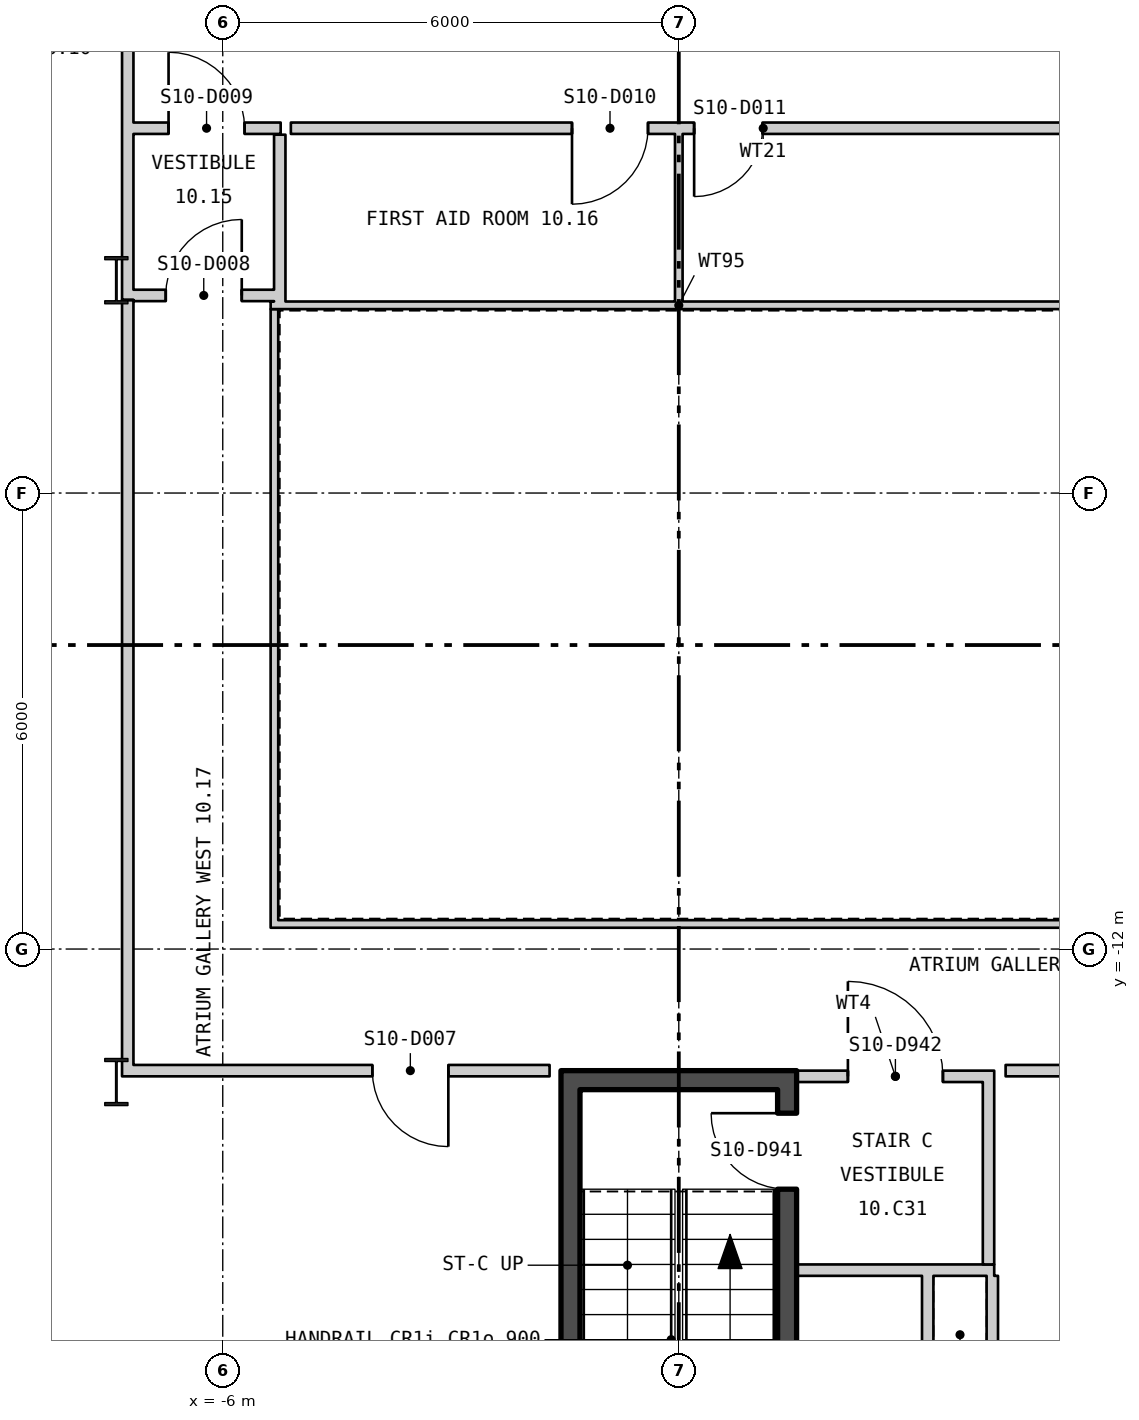
"""IFC4 building model, lengths in metres.
Left out: names, types, materials, properties, quantities, classifications, styles, units other than length and angle.
Written with IfcOpenShell. Run it as: python <this file> out.ifc"""

import sys

from ifc_helpers import new_model, si_unit, direction, frame, frame_2d, origin, origin_2d, place, context, subcontext, project, spatial, polyline, rectangle, i_section, outline, extrude, element, fill, save


model = new_model("IFC4")
c1 = context("Model", 3, precision=1e-05, world=origin(), true_north=direction((0.0, 1.0)))
c2 = subcontext(c1, "Body", "Model", "MODEL_VIEW")
j1 = project(units=[si_unit("LENGTHUNIT", "METRE"), si_unit("PLANEANGLEUNIT", "RADIAN")], contexts=[c1])
p1 = place(None, origin())
s1 = spatial("IfcSite", under=j1, at=p1, CompositionType="ELEMENT")
p2 = place(p1, origin())
s2 = spatial("IfcBuilding", under=s1, at=p2, CompositionType="ELEMENT")
p3 = place(p2, frame((0.0, 0.0, 139.8)))
s3 = spatial("IfcBuildingStorey", under=s2, at=p3, CompositionType="ELEMENT", Elevation=139.8)
for number, where, z_axis, x_axis in (
    (1, (-7.4, -3.2, 0.0), (0.0, 0.0, 1.0), (1.0, 0.0, 0.0)),
    (2, (-7.4, -13.75, 0.0), (0.0, 0.0, 1.0), (1.0, 0.0, 0.0)),
):
    element("IfcColumn", number, at=place(p3, frame(where, z_axis=z_axis, x_axis=x_axis)), inside=s3, PredefinedType="COLUMN", context=c2, shape_type="SweptSolid", body=[
        extrude(i_section(OverallWidth=0.305, OverallDepth=0.62, WebThickness=0.021, FlangeThickness=0.04, at=origin_2d()), origin(), (0.0, 0.0, 1.0), 3.9),
    ])
p4 = place(p3, frame((-27.235, 12.423, -0.18), z_axis=(0.0, 0.0, 1.0), x_axis=(0.500000335318, -0.866025210188, 0.0)))
e3 = element("IfcWall", 3, at=p4, inside=s3, PredefinedType="SOLIDWALL", context=c2, shape_type="SweptSolid", body=[
    extrude(outline(polyline([(-0.13, -0.225), (45.88, -0.225), (45.62, 0.225), (0.13, 0.225), (-0.13, -0.225)])), origin(), (0.0, 0.0, 1.0), 3.68),
])
p5 = place(p4, frame((1.425, 0.0, 1.08)))
e4 = element("IfcOpeningElement", 4, at=p5, cuts=e3, PredefinedType="OPENING", context=c2, shape_type="SweptSolid", body=[
    extrude(rectangle(XDim=2.4, YDim=2.0, at=frame_2d((1.2, 1.0))), frame((0.0, 0.235, 0.0), z_axis=(0.0, -1.0, 0.0), x_axis=(1.0, 0.0, 0.0)), (0.0, 0.0, 1.0), 0.47),
])
p6 = place(p4, frame((5.895, 0.0, 1.08)))
e5 = element("IfcOpeningElement", 5, at=p6, cuts=e3, PredefinedType="OPENING", context=c2, shape_type="SweptSolid", body=[
    extrude(rectangle(XDim=2.4, YDim=2.0, at=frame_2d((1.2, 1.0))), frame((0.0, 0.235, 0.0), z_axis=(0.0, -1.0, 0.0), x_axis=(1.0, 0.0, 0.0)), (0.0, 0.0, 1.0), 0.47),
])
p7 = place(p4, frame((10.403, 0.0, 1.08)))
e6 = element("IfcOpeningElement", 6, at=p7, cuts=e3, PredefinedType="OPENING", context=c2, shape_type="SweptSolid", body=[
    extrude(rectangle(XDim=2.4, YDim=2.0, at=frame_2d((1.2, 1.0))), frame((0.0, 0.235, 0.0), z_axis=(0.0, -1.0, 0.0), x_axis=(1.0, 0.0, 0.0)), (0.0, 0.0, 1.0), 0.47),
])
p8 = place(p4, frame((14.912, 0.0, 1.08)))
e7 = element("IfcOpeningElement", 7, at=p8, cuts=e3, PredefinedType="OPENING", context=c2, shape_type="SweptSolid", body=[
    extrude(rectangle(XDim=2.4, YDim=2.0, at=frame_2d((1.2, 1.0))), frame((0.0, 0.235, 0.0), z_axis=(0.0, -1.0, 0.0), x_axis=(1.0, 0.0, 0.0)), (0.0, 0.0, 1.0), 0.47),
])
p9 = place(p4, frame((19.421, 0.0, 1.08)))
e8 = element("IfcOpeningElement", 8, at=p9, cuts=e3, PredefinedType="OPENING", context=c2, shape_type="SweptSolid", body=[
    extrude(rectangle(XDim=2.4, YDim=2.0, at=frame_2d((1.2, 1.0))), frame((0.0, 0.235, 0.0), z_axis=(0.0, -1.0, 0.0), x_axis=(1.0, 0.0, 0.0)), (0.0, 0.0, 1.0), 0.47),
])
p10 = place(p4, frame((23.929, 0.0, 1.08)))
e9 = element("IfcOpeningElement", 9, at=p10, cuts=e3, PredefinedType="OPENING", context=c2, shape_type="SweptSolid", body=[
    extrude(rectangle(XDim=2.4, YDim=2.0, at=frame_2d((1.2, 1.0))), frame((0.0, 0.235, 0.0), z_axis=(0.0, -1.0, 0.0), x_axis=(1.0, 0.0, 0.0)), (0.0, 0.0, 1.0), 0.47),
])
p11 = place(p4, frame((28.438, 0.0, 1.08)))
e10 = element("IfcOpeningElement", 10, at=p11, cuts=e3, PredefinedType="OPENING", context=c2, shape_type="SweptSolid", body=[
    extrude(rectangle(XDim=2.4, YDim=2.0, at=frame_2d((1.2, 1.0))), frame((0.0, 0.235, 0.0), z_axis=(0.0, -1.0, 0.0), x_axis=(1.0, 0.0, 0.0)), (0.0, 0.0, 1.0), 0.47),
])
p12 = place(p4, frame((32.947, 0.0, 1.08)))
e11 = element("IfcOpeningElement", 11, at=p12, cuts=e3, PredefinedType="OPENING", context=c2, shape_type="SweptSolid", body=[
    extrude(rectangle(XDim=2.4, YDim=2.0, at=frame_2d((1.2, 1.0))), frame((0.0, 0.235, 0.0), z_axis=(0.0, -1.0, 0.0), x_axis=(1.0, 0.0, 0.0)), (0.0, 0.0, 1.0), 0.47),
])
p13 = place(p4, frame((37.455, 0.0, 1.08)))
e12 = element("IfcOpeningElement", 12, at=p13, cuts=e3, PredefinedType="OPENING", context=c2, shape_type="SweptSolid", body=[
    extrude(rectangle(XDim=2.4, YDim=2.0, at=frame_2d((1.2, 1.0))), frame((0.0, 0.235, 0.0), z_axis=(0.0, -1.0, 0.0), x_axis=(1.0, 0.0, 0.0)), (0.0, 0.0, 1.0), 0.47),
])
p14 = place(p4, frame((41.925, 0.0, 1.08)))
e13 = element("IfcOpeningElement", 13, at=p14, cuts=e3, PredefinedType="OPENING", context=c2, shape_type="SweptSolid", body=[
    extrude(rectangle(XDim=2.4, YDim=2.0, at=frame_2d((1.2, 1.0))), frame((0.0, 0.235, 0.0), z_axis=(0.0, -1.0, 0.0), x_axis=(1.0, 0.0, 0.0)), (0.0, 0.0, 1.0), 0.47),
])
p15 = place(p3, frame((4.36, -27.198, -0.18), z_axis=(0.0, 0.0, 1.0), x_axis=(0.500000335318, 0.866025210188, 0.0)))
e14 = element("IfcWall", 14, at=p15, inside=s3, PredefinedType="SOLIDWALL", context=c2, shape_type="SweptSolid", body=[
    extrude(outline(polyline([(-0.13, -0.225), (45.88, -0.225), (45.62, 0.225), (0.13, 0.225), (-0.13, -0.225)])), origin(), (0.0, 0.0, 1.0), 3.68),
])
p16 = place(p15, frame((1.425, 0.0, 1.08)))
e15 = element("IfcOpeningElement", 15, at=p16, cuts=e14, PredefinedType="OPENING", context=c2, shape_type="SweptSolid", body=[
    extrude(rectangle(XDim=2.4, YDim=2.0, at=frame_2d((1.2, 1.0))), frame((0.0, 0.235, 0.0), z_axis=(0.0, -1.0, 0.0), x_axis=(1.0, 0.0, 0.0)), (0.0, 0.0, 1.0), 0.47),
])
p17 = place(p15, frame((5.895, 0.0, 1.08)))
e16 = element("IfcOpeningElement", 16, at=p17, cuts=e14, PredefinedType="OPENING", context=c2, shape_type="SweptSolid", body=[
    extrude(rectangle(XDim=2.4, YDim=2.0, at=frame_2d((1.2, 1.0))), frame((0.0, 0.235, 0.0), z_axis=(0.0, -1.0, 0.0), x_axis=(1.0, 0.0, 0.0)), (0.0, 0.0, 1.0), 0.47),
])
p18 = place(p15, frame((10.403, 0.0, 1.08)))
e17 = element("IfcOpeningElement", 17, at=p18, cuts=e14, PredefinedType="OPENING", context=c2, shape_type="SweptSolid", body=[
    extrude(rectangle(XDim=2.4, YDim=2.0, at=frame_2d((1.2, 1.0))), frame((0.0, 0.235, 0.0), z_axis=(0.0, -1.0, 0.0), x_axis=(1.0, 0.0, 0.0)), (0.0, 0.0, 1.0), 0.47),
])
p19 = place(p15, frame((14.912, 0.0, 1.08)))
e18 = element("IfcOpeningElement", 18, at=p19, cuts=e14, PredefinedType="OPENING", context=c2, shape_type="SweptSolid", body=[
    extrude(rectangle(XDim=2.4, YDim=2.0, at=frame_2d((1.2, 1.0))), frame((0.0, 0.235, 0.0), z_axis=(0.0, -1.0, 0.0), x_axis=(1.0, 0.0, 0.0)), (0.0, 0.0, 1.0), 0.47),
])
p20 = place(p15, frame((19.421, 0.0, 1.08)))
e19 = element("IfcOpeningElement", 19, at=p20, cuts=e14, PredefinedType="OPENING", context=c2, shape_type="SweptSolid", body=[
    extrude(rectangle(XDim=2.4, YDim=2.0, at=frame_2d((1.2, 1.0))), frame((0.0, 0.235, 0.0), z_axis=(0.0, -1.0, 0.0), x_axis=(1.0, 0.0, 0.0)), (0.0, 0.0, 1.0), 0.47),
])
p21 = place(p15, frame((23.929, 0.0, 1.08)))
e20 = element("IfcOpeningElement", 20, at=p21, cuts=e14, PredefinedType="OPENING", context=c2, shape_type="SweptSolid", body=[
    extrude(rectangle(XDim=2.4, YDim=2.0, at=frame_2d((1.2, 1.0))), frame((0.0, 0.235, 0.0), z_axis=(0.0, -1.0, 0.0), x_axis=(1.0, 0.0, 0.0)), (0.0, 0.0, 1.0), 0.47),
])
p22 = place(p15, frame((37.455, 0.0, 1.08)))
e21 = element("IfcOpeningElement", 21, at=p22, cuts=e14, PredefinedType="OPENING", context=c2, shape_type="SweptSolid", body=[
    extrude(rectangle(XDim=2.4, YDim=2.0, at=frame_2d((1.2, 1.0))), frame((0.0, 0.235, 0.0), z_axis=(0.0, -1.0, 0.0), x_axis=(1.0, 0.0, 0.0)), (0.0, 0.0, 1.0), 0.47),
])
p23 = place(p15, frame((41.925, 0.0, 1.08)))
e22 = element("IfcOpeningElement", 22, at=p23, cuts=e14, PredefinedType="OPENING", context=c2, shape_type="SweptSolid", body=[
    extrude(rectangle(XDim=2.4, YDim=2.0, at=frame_2d((1.2, 1.0))), frame((0.0, 0.235, 0.0), z_axis=(0.0, -1.0, 0.0), x_axis=(1.0, 0.0, 0.0)), (0.0, 0.0, 1.0), 0.47),
])
for number, where, z_axis, x_axis in (
    (23, (-5.37, -11.67, 0.0), (0.0, 0.0, 1.0), (1.0, 0.0, 0.0)),
    (24, (5.37, -3.53, 0.0), (0.0, 0.0, 1.0), (-1.0, 0.0, 0.0)),
):
    element("IfcWall", number, at=place(p3, frame(where, z_axis=z_axis, x_axis=x_axis)), inside=s3, PredefinedType="PARTITIONING", context=c2, shape_type="SweptSolid", body=[
        extrude(rectangle(XDim=10.74, YDim=0.1, at=frame_2d((5.37, 0.0))), origin(), (0.0, 0.0, 1.0), 3.7),
    ])
p24 = place(p3, frame((-5.32, -3.58, 0.0), z_axis=(0.0, 0.0, 1.0), x_axis=(0.0, -1.0, 0.0)))
e25 = element("IfcWall", 25, at=p24, inside=s3, PredefinedType="PARTITIONING", context=c2, shape_type="SweptSolid", body=[
    extrude(rectangle(XDim=8.04, YDim=0.1, at=frame_2d((4.02, 0.0))), origin(), (0.0, 0.0, 1.0), 3.7),
])
p25 = place(p3, frame((-1.425, -21.05, 0.0), z_axis=(0.0, 0.0, 1.0), x_axis=(0.0, 1.0, 0.0)))
e26 = element("IfcWall", 26, at=p25, inside=s3, PredefinedType="SHEAR", context=c2, shape_type="SweptSolid", body=[
    extrude(rectangle(XDim=7.2, YDim=0.25, at=frame_2d((3.6, 0.0))), origin(), (0.0, 0.0, 1.0), 3.7),
])
p26 = place(p3, frame((1.425, -21.05, 0.0), z_axis=(0.0, 0.0, 1.0), x_axis=(0.0, 1.0, 0.0)))
e27 = element("IfcWall", 27, at=p26, inside=s3, PredefinedType="SHEAR", context=c2, shape_type="SweptSolid", body=[
    extrude(rectangle(XDim=7.2, YDim=0.25, at=frame_2d((3.6, 0.0))), origin(), (0.0, 0.0, 1.0), 3.7),
])
p27 = place(p26, frame((5.89, 0.0, 0.0)))
e28 = element("IfcOpeningElement", 28, at=p27, cuts=e27, PredefinedType="OPENING", context=c2, shape_type="SweptSolid", body=[
    extrude(rectangle(XDim=1.0, YDim=2.1, at=frame_2d((0.5, 1.05))), frame((0.0, 0.135, 0.0), z_axis=(0.0, -1.0, 0.0), x_axis=(1.0, 0.0, 0.0)), (0.0, 0.0, 1.0), 0.27),
])
p28 = place(p3, frame((-1.55, -13.725, 0.0), z_axis=(0.0, 0.0, 1.0), x_axis=(1.0, 0.0, 0.0)))
e29 = element("IfcWall", 29, at=p28, inside=s3, PredefinedType="SHEAR", context=c2, shape_type="SweptSolid", body=[
    extrude(rectangle(XDim=3.1, YDim=0.25, at=frame_2d((1.55, 0.0))), origin(), (0.0, 0.0, 1.0), 3.7),
])
p29 = place(p3, frame((1.55, -16.225, 0.0), z_axis=(0.0, 0.0, 1.0), x_axis=(1.0, 0.0, 0.0)))
e30 = element("IfcWall", 30, at=p29, inside=s3, PredefinedType="PARTITIONING", context=c2, shape_type="SweptSolid", body=[
    extrude(rectangle(XDim=2.6, YDim=0.15, at=frame_2d((1.3, 0.0))), origin(), (0.0, 0.0, 1.0), 3.7),
])
p30 = place(p3, frame((4.075, -16.15, 0.0), z_axis=(0.0, 0.0, 1.0), x_axis=(0.0, 1.0, 0.0)))
e31 = element("IfcWall", 31, at=p30, inside=s3, PredefinedType="PARTITIONING", context=c2, shape_type="SweptSolid", body=[
    extrude(rectangle(XDim=2.4, YDim=0.15, at=frame_2d((1.2, 0.0))), origin(), (0.0, 0.0, 1.0), 3.7),
])
p31 = place(p3, frame((1.55, -13.675, 0.0), z_axis=(0.0, 0.0, 1.0), x_axis=(1.0, 0.0, 0.0)))
e32 = element("IfcWall", 32, at=p31, inside=s3, PredefinedType="PARTITIONING", context=c2, shape_type="SweptSolid", body=[
    extrude(rectangle(XDim=2.6, YDim=0.15, at=frame_2d((1.3, 0.0))), origin(), (0.0, 0.0, 1.0), 2.79),
])
p32 = place(p31, frame((0.675, 0.0, 0.0)))
e33 = element("IfcOpeningElement", 33, at=p32, cuts=e32, PredefinedType="OPENING", context=c2, shape_type="SweptSolid", body=[
    extrude(rectangle(XDim=1.25, YDim=2.1, at=frame_2d((0.625, 1.05))), frame((0.0, 0.085, 0.0), z_axis=(0.0, -1.0, 0.0), x_axis=(1.0, 0.0, 0.0)), (0.0, 0.0, 1.0), 0.17),
])
p33 = place(p3, frame((3.275, -18.0, 0.0), z_axis=(0.0, 0.0, 1.0), x_axis=(0.0, 1.0, 0.0)))
e34 = element("IfcWall", 34, at=p33, inside=s3, PredefinedType="PARTITIONING", context=c2, shape_type="SweptSolid", body=[
    extrude(rectangle(XDim=1.7, YDim=0.15, at=frame_2d((0.85, 0.0))), origin(), (0.0, 0.0, 1.0), 3.01),
])
p34 = place(p3, frame((4.125, -18.0, 0.0), z_axis=(0.0, 0.0, 1.0), x_axis=(0.0, 1.0, 0.0)))
e35 = element("IfcWall", 35, at=p34, inside=s3, PredefinedType="PARTITIONING", context=c2, shape_type="SweptSolid", body=[
    extrude(rectangle(XDim=1.7, YDim=0.15, at=frame_2d((0.85, 0.0))), origin(), (0.0, 0.0, 1.0), 3.7),
])
p35 = place(p3, frame((-7.25, -13.675, 0.0), z_axis=(0.0, 0.0, 1.0), x_axis=(0.0, 1.0, 0.0)))
e36 = element("IfcWall", 36, at=p35, inside=s3, PredefinedType="PARTITIONING", context=c2, shape_type="SweptSolid", body=[
    extrude(rectangle(XDim=10.215, YDim=0.15, at=frame_2d((5.107, 0.0))), origin(), (0.0, 0.0, 1.0), 3.11),
])
p36 = place(p3, frame((-7.25, -3.46, 0.0), z_axis=(0.0, 0.0, 1.0), x_axis=(0.0, 1.0, 0.0)))
e37 = element("IfcWall", 37, at=p36, inside=s3, PredefinedType="PARTITIONING", context=c2, shape_type="SweptSolid", body=[
    extrude(rectangle(XDim=5.46, YDim=0.15, at=frame_2d((2.73, 0.0))), origin(), (0.0, 0.0, 1.0), 3.7),
])
p37 = place(p36, frame((4.06, 0.0, 0.0)))
e38 = element("IfcOpeningElement", 38, at=p37, cuts=e37, PredefinedType="OPENING", context=c2, shape_type="SweptSolid", body=[
    extrude(rectangle(XDim=1.0, YDim=2.1, at=frame_2d((0.5, 1.05))), frame((0.0, 0.085, 0.0), z_axis=(0.0, -1.0, 0.0), x_axis=(1.0, 0.0, 0.0)), (0.0, 0.0, 1.0), 0.17),
])
p38 = place(p3, frame((-7.175, -13.6, 0.0), z_axis=(0.0, 0.0, 1.0), x_axis=(1.0, 0.0, 0.0)))
e39 = element("IfcWall", 39, at=p38, inside=s3, PredefinedType="PARTITIONING", context=c2, shape_type="SweptSolid", body=[
    extrude(rectangle(XDim=5.475, YDim=0.15, at=frame_2d((2.737, 0.0))), origin(), (0.0, 0.0, 1.0), 2.79),
])
p39 = place(p38, frame((3.143, 0.0, 0.0)))
e40 = element("IfcOpeningElement", 40, at=p39, cuts=e39, PredefinedType="OPENING", context=c2, shape_type="SweptSolid", body=[
    extrude(rectangle(XDim=1.0, YDim=2.1, at=frame_2d((0.5, 1.05))), frame((0.0, 0.085, 0.0), z_axis=(0.0, -1.0, 0.0), x_axis=(1.0, 0.0, 0.0)), (0.0, 0.0, 1.0), 0.17),
])
p40 = place(p3, frame((-7.175, -3.4, 0.0), z_axis=(0.0, 0.0, 1.0), x_axis=(1.0, 0.0, 0.0)))
e41 = element("IfcWall", 41, at=p40, inside=s3, PredefinedType="PARTITIONING", context=c2, shape_type="SweptSolid", body=[
    extrude(rectangle(XDim=1.85, YDim=0.15, at=frame_2d((0.925, 0.0))), origin(), (0.0, 0.0, 1.0), 3.7),
])
p41 = place(p40, frame((0.425, 0.0, 0.0)))
e42 = element("IfcOpeningElement", 42, at=p41, cuts=e41, PredefinedType="OPENING", context=c2, shape_type="SweptSolid", body=[
    extrude(rectangle(XDim=1.0, YDim=2.1, at=frame_2d((0.5, 1.05))), frame((0.0, 0.085, 0.0), z_axis=(0.0, -1.0, 0.0), x_axis=(1.0, 0.0, 0.0)), (0.0, 0.0, 1.0), 0.17),
])
p42 = place(p3, frame((-7.175, -1.2, 0.0), z_axis=(0.0, 0.0, 1.0), x_axis=(1.0, 0.0, 0.0)))
e43 = element("IfcWall", 43, at=p42, inside=s3, PredefinedType="PARTITIONING", context=c2, shape_type="SweptSolid", body=[
    extrude(rectangle(XDim=1.937, YDim=0.15, at=frame_2d((0.969, 0.0))), origin(), (0.0, 0.0, 1.0), 3.7),
])
p43 = place(p42, frame((0.462, 0.0, 0.0)))
e44 = element("IfcOpeningElement", 44, at=p43, cuts=e43, PredefinedType="OPENING", context=c2, shape_type="SweptSolid", body=[
    extrude(rectangle(XDim=1.0, YDim=2.1, at=frame_2d((0.5, 1.05))), frame((0.0, 0.085, 0.0), z_axis=(0.0, -1.0, 0.0), x_axis=(1.0, 0.0, 0.0)), (0.0, 0.0, 1.0), 0.17),
])
p44 = place(p3, frame((-5.25, -3.48, 0.0), z_axis=(0.0, 0.0, 1.0), x_axis=(0.0, 1.0, 0.0)))
e45 = element("IfcWall", 45, at=p44, inside=s3, PredefinedType="PARTITIONING", context=c2, shape_type="SweptSolid", body=[
    extrude(rectangle(XDim=2.195, YDim=0.15, at=frame_2d((1.097, 0.0))), origin(), (0.0, 0.0, 1.0), 3.7),
])
p45 = place(p3, frame((-5.104, -1.2, 0.0), z_axis=(0.0, 0.0, 1.0), x_axis=(1.0, 0.0, 0.0)))
e46 = element("IfcWall", 46, at=p45, inside=s3, PredefinedType="PARTITIONING", context=c2, shape_type="SweptSolid", body=[
    extrude(rectangle(XDim=12.429, YDim=0.15, at=frame_2d((6.215, 0.0))), origin(), (0.0, 0.0, 1.0), 3.7),
])
p46 = place(p45, frame((3.699, 0.0, 0.0)))
e47 = element("IfcOpeningElement", 47, at=p46, cuts=e46, PredefinedType="OPENING", context=c2, shape_type="SweptSolid", body=[
    extrude(rectangle(XDim=1.0, YDim=2.1, at=frame_2d((0.5, 1.05))), frame((0.0, 0.085, 0.0), z_axis=(0.0, -1.0, 0.0), x_axis=(1.0, 0.0, 0.0)), (0.0, 0.0, 1.0), 0.17),
])
p47 = place(p45, frame((5.306, 0.0, 0.0)))
e48 = element("IfcOpeningElement", 48, at=p47, cuts=e46, PredefinedType="OPENING", context=c2, shape_type="SweptSolid", body=[
    extrude(rectangle(XDim=0.9, YDim=2.1, at=frame_2d((0.45, 1.05))), frame((0.0, 0.085, 0.0), z_axis=(0.0, -1.0, 0.0), x_axis=(1.0, 0.0, 0.0)), (0.0, 0.0, 1.0), 0.17),
])
p48 = place(p3, frame((0.0, -3.48, 0.0), z_axis=(0.0, 0.0, 1.0), x_axis=(0.0, 1.0, 0.0)))
e49 = element("IfcWall", 49, at=p48, inside=s3, PredefinedType="PARTITIONING", context=c2, shape_type="SweptSolid", body=[
    extrude(rectangle(XDim=0.381, YDim=0.1, at=frame_2d((0.191, 0.0))), origin(), (0.0, 0.0, 1.0), 3.7),
])
p49 = place(p3, frame((0.0, -3.099, 0.0), z_axis=(0.0, 0.0, 1.0), x_axis=(0.0, 1.0, 0.0)))
e50 = element("IfcWall", 50, at=p49, inside=s3, PredefinedType="PARTITIONING", context=c2, shape_type="SweptSolid", body=[
    extrude(rectangle(XDim=1.824, YDim=0.1, at=frame_2d((0.912, 0.0))), origin(), (0.0, 0.0, 1.0), 3.15),
])
p50 = place(p3, frame((4.3, -13.6, 0.0), z_axis=(0.0, 0.0, 1.0), x_axis=(1.0, 0.0, 0.0)))
e51 = element("IfcWall", 51, at=p50, inside=s3, PredefinedType="PARTITIONING", context=c2, shape_type="SweptSolid", body=[
    extrude(rectangle(XDim=3.025, YDim=0.15, at=frame_2d((1.512, 0.0))), origin(), (0.0, 0.0, 1.0), 2.79),
])
p51 = place(p27, origin())
e52 = element("IfcDoor", 52, at=p51, inside=s3, OperationType="SINGLE_SWING_LEFT", PredefinedType="DOOR", context=c2, shape_type="SweptSolid", body=[
    extrude(rectangle(XDim=1.0, YDim=2.1, at=frame_2d((0.5, 1.05))), frame((0.0, 0.025, 0.0), z_axis=(0.0, -1.0, 0.0), x_axis=(1.0, 0.0, 0.0)), (0.0, 0.0, 1.0), 0.05),
])
fill(e28, e52)
p52 = place(p32, origin())
e53 = element("IfcDoor", 53, at=p52, inside=s3, OperationType="SINGLE_SWING_RIGHT", PredefinedType="DOOR", context=c2, shape_type="SweptSolid", body=[
    extrude(rectangle(XDim=1.25, YDim=2.1, at=frame_2d((0.625, 1.05))), frame((0.0, 0.025, 0.0), z_axis=(0.0, -1.0, 0.0), x_axis=(1.0, 0.0, 0.0)), (0.0, 0.0, 1.0), 0.05),
])
fill(e33, e53)
p53 = place(p39, origin())
e54 = element("IfcDoor", 54, at=p53, inside=s3, OperationType="SINGLE_SWING_RIGHT", PredefinedType="DOOR", context=c2, shape_type="SweptSolid", body=[
    extrude(rectangle(XDim=1.0, YDim=2.1, at=frame_2d((0.5, 1.05))), frame((0.0, 0.025, 0.0), z_axis=(0.0, -1.0, 0.0), x_axis=(1.0, 0.0, 0.0)), (0.0, 0.0, 1.0), 0.05),
])
fill(e40, e54)
p54 = place(p41, origin())
e55 = element("IfcDoor", 55, at=p54, inside=s3, OperationType="SINGLE_SWING_LEFT", PredefinedType="DOOR", context=c2, shape_type="SweptSolid", body=[
    extrude(rectangle(XDim=1.0, YDim=2.1, at=frame_2d((0.5, 1.05))), frame((0.0, 0.025, 0.0), z_axis=(0.0, -1.0, 0.0), x_axis=(1.0, 0.0, 0.0)), (0.0, 0.0, 1.0), 0.05),
])
fill(e42, e55)
p55 = place(p43, origin())
e56 = element("IfcDoor", 56, at=p55, inside=s3, OperationType="SINGLE_SWING_RIGHT", PredefinedType="DOOR", context=c2, shape_type="SweptSolid", body=[
    extrude(rectangle(XDim=1.0, YDim=2.1, at=frame_2d((0.5, 1.05))), frame((0.0, 0.025, 0.0), z_axis=(0.0, -1.0, 0.0), x_axis=(1.0, 0.0, 0.0)), (0.0, 0.0, 1.0), 0.05),
])
fill(e44, e56)
p56 = place(p46, origin())
e57 = element("IfcDoor", 57, at=p56, inside=s3, OperationType="SINGLE_SWING_LEFT", PredefinedType="DOOR", context=c2, shape_type="SweptSolid", body=[
    extrude(rectangle(XDim=1.0, YDim=2.1, at=frame_2d((0.5, 1.05))), frame((0.0, 0.025, 0.0), z_axis=(0.0, -1.0, 0.0), x_axis=(1.0, 0.0, 0.0)), (0.0, 0.0, 1.0), 0.05),
])
fill(e47, e57)
p57 = place(p47, origin())
e58 = element("IfcDoor", 58, at=p57, inside=s3, OperationType="SINGLE_SWING_LEFT", PredefinedType="DOOR", context=c2, shape_type="SweptSolid", body=[
    extrude(rectangle(XDim=0.9, YDim=2.1, at=frame_2d((0.45, 1.05))), frame((0.0, 0.025, 0.0), z_axis=(0.0, -1.0, 0.0), x_axis=(1.0, 0.0, 0.0)), (0.0, 0.0, 1.0), 0.05),
])
fill(e48, e58)
save(model, sys.argv[1])
